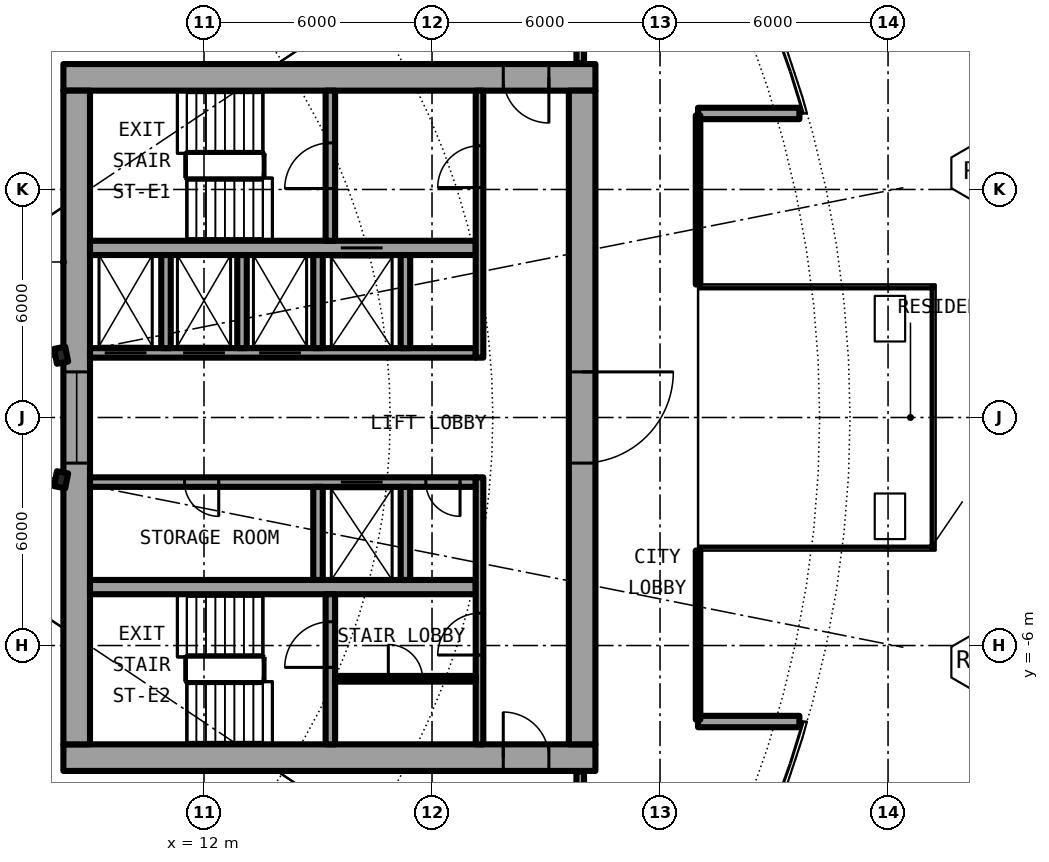
"""IFC4 building model, lengths in metres.
Left out: names, types, materials, properties, quantities, classifications, styles, units other than length and angle.
Written with IfcOpenShell. Run it as: python <this file> out.ifc"""

import sys

from ifc_helpers import new_model, si_unit, direction, frame, frame_2d, origin, origin_2d, place, context, subcontext, project, spatial, rectangle, i_section, extrude, element, fill, save


model = new_model("IFC4")
c1 = context("Model", 3, precision=1e-05, world=origin(), true_north=direction((0.0, 1.0)))
c2 = subcontext(c1, "Body", "Model", "MODEL_VIEW")
j1 = project(units=[si_unit("LENGTHUNIT", "METRE"), si_unit("PLANEANGLEUNIT", "RADIAN")], contexts=[c1])
p1 = place(None, origin())
s1 = spatial("IfcSite", under=j1, at=p1, CompositionType="ELEMENT")
p2 = place(p1, origin())
s2 = spatial("IfcBuilding", under=s1, at=p2, CompositionType="ELEMENT")
p3 = place(p2, frame((0.0, 0.0, 97.15)))
s3 = spatial("IfcBuildingStorey", under=s2, at=p3, CompositionType="ELEMENT", Elevation=97.15)
for number, where, z_axis, x_axis in (
    (1, (8.239, 1.639, 0.0), (0.0, 0.0, 1.0), (0.981, 0.195, 0.0)),
    (2, (8.239, -1.639, 0.0), (0.0, 0.0, 1.0), (0.981, -0.195, 0.0)),
):
    element("IfcColumn", number, at=place(p3, frame(where, z_axis=z_axis, x_axis=x_axis)), inside=s3, PredefinedType="COLUMN", context=c2, shape_type="SweptSolid", body=[
        extrude(i_section(OverallWidth=0.3, OverallDepth=0.4, WebThickness=0.013, FlangeThickness=0.024, FilletRadius=0.027, at=origin_2d()), origin(), (0.0, 0.0, 1.0), 6.1),
    ])
for number, where, z_axis, x_axis in (
    (3, (25.0, 8.0, 0.0), (0.0, 0.0, 1.0), (1.0, 0.0, 0.0)),
    (4, (25.0, -8.0, 0.0), (0.0, 0.0, 1.0), (1.0, 0.0, 0.0)),
):
    element("IfcWall", number, at=place(p3, frame(where, z_axis=z_axis, x_axis=x_axis)), inside=s3, PredefinedType="SOLIDWALL", context=c2, shape_type="SweptSolid", body=[
        extrude(rectangle(XDim=2.667, YDim=0.3, at=frame_2d((1.333, 0.0))), origin(), (0.0, 0.0, 1.0), 5.7),
    ])
p4 = place(p3, frame((22.3, 8.95, 0.0), z_axis=(0.0, 0.0, 1.0), x_axis=(-1.0, 0.0, 0.0)))
e5 = element("IfcWall", 5, at=p4, inside=s3, PredefinedType="SHEAR", context=c2, shape_type="SweptSolid", body=[
    extrude(rectangle(XDim=14.0, YDim=0.7, at=frame_2d((7.0, 0.0))), origin(), (0.0, 0.0, 1.0), 6.1),
])
p5 = place(p4, frame((1.225, 0.0, 0.0)))
e6 = element("IfcOpeningElement", 6, at=p5, cuts=e5, PredefinedType="OPENING", context=c2, shape_type="SweptSolid", body=[
    extrude(rectangle(XDim=1.2, YDim=2.3, at=frame_2d((0.6, 1.15))), frame((0.0, 0.36, 0.0), z_axis=(0.0, -1.0, 0.0), x_axis=(1.0, 0.0, 0.0)), (0.0, 0.0, 1.0), 0.72),
])
p6 = place(p3, frame((8.3, -8.95, 0.0), z_axis=(0.0, 0.0, 1.0), x_axis=(1.0, 0.0, 0.0)))
e7 = element("IfcWall", 7, at=p6, inside=s3, PredefinedType="SHEAR", context=c2, shape_type="SweptSolid", body=[
    extrude(rectangle(XDim=14.0, YDim=0.7, at=frame_2d((7.0, 0.0))), origin(), (0.0, 0.0, 1.0), 6.1),
])
p7 = place(p6, frame((11.575, 0.0, 0.0)))
e8 = element("IfcOpeningElement", 8, at=p7, cuts=e7, PredefinedType="OPENING", context=c2, shape_type="SweptSolid", body=[
    extrude(rectangle(XDim=1.2, YDim=2.3, at=frame_2d((0.6, 1.15))), frame((0.0, 0.36, 0.0), z_axis=(0.0, -1.0, 0.0), x_axis=(1.0, 0.0, 0.0)), (0.0, 0.0, 1.0), 0.72),
])
p8 = place(p3, frame((21.95, 8.6, 0.0), z_axis=(0.0, 0.0, 1.0), x_axis=(0.0, -1.0, 0.0)))
e9 = element("IfcWall", 9, at=p8, inside=s3, PredefinedType="SHEAR", context=c2, shape_type="SweptSolid", body=[
    extrude(rectangle(XDim=17.2, YDim=0.7, at=frame_2d((8.6, 0.0))), origin(), (0.0, 0.0, 1.0), 6.1),
])
p9 = place(p8, frame((7.4, 0.0, 0.0)))
e10 = element("IfcOpeningElement", 10, at=p9, cuts=e9, PredefinedType="OPENING", context=c2, shape_type="SweptSolid", body=[
    extrude(rectangle(XDim=2.4, YDim=2.3, at=frame_2d((1.2, 1.15))), frame((0.0, 0.36, 0.0), z_axis=(0.0, -1.0, 0.0), x_axis=(1.0, 0.0, 0.0)), (0.0, 0.0, 1.0), 0.72),
])
p10 = place(p3, frame((8.65, -8.6, 0.0), z_axis=(0.0, 0.0, 1.0), x_axis=(0.0, 1.0, 0.0)))
e11 = element("IfcWall", 11, at=p10, inside=s3, PredefinedType="SHEAR", context=c2, shape_type="SweptSolid", body=[
    extrude(rectangle(XDim=17.2, YDim=0.7, at=frame_2d((8.6, 0.0))), origin(), (0.0, 0.0, 1.0), 6.1),
])
p11 = place(p10, frame((7.4, 0.0, 0.1)))
e12 = element("IfcOpeningElement", 12, at=p11, cuts=e11, PredefinedType="OPENING", context=c2, shape_type="SweptSolid", body=[
    extrude(rectangle(XDim=2.4, YDim=2.2, at=frame_2d((1.2, 1.1))), frame((0.0, 0.36, 0.0), z_axis=(0.0, -1.0, 0.0), x_axis=(1.0, 0.0, 0.0)), (0.0, 0.0, 1.0), 0.72),
])
p12 = place(p3, frame((9.0, 1.7, 0.0), z_axis=(0.0, 0.0, 1.0), x_axis=(1.0, 0.0, 0.0)))
e13 = element("IfcWall", 13, at=p12, inside=s3, PredefinedType="SHEAR", context=c2, shape_type="SweptSolid", body=[
    extrude(rectangle(XDim=10.15, YDim=0.25, at=frame_2d((5.075, 0.0))), origin(), (0.0, 0.0, 1.0), 6.1),
])
p13 = place(p12, frame((0.387, 0.0, 0.0)))
e14 = element("IfcOpeningElement", 14, at=p13, cuts=e13, PredefinedType="OPENING", context=c2, shape_type="SweptSolid", body=[
    extrude(rectangle(XDim=1.1, YDim=2.3, at=frame_2d((0.55, 1.15))), frame((0.0, 0.135, 0.0), z_axis=(0.0, -1.0, 0.0), x_axis=(1.0, 0.0, 0.0)), (0.0, 0.0, 1.0), 0.27),
])
p14 = place(p12, frame((2.45, 0.0, 0.0)))
e15 = element("IfcOpeningElement", 15, at=p14, cuts=e13, PredefinedType="OPENING", context=c2, shape_type="SweptSolid", body=[
    extrude(rectangle(XDim=1.1, YDim=2.3, at=frame_2d((0.55, 1.15))), frame((0.0, 0.135, 0.0), z_axis=(0.0, -1.0, 0.0), x_axis=(1.0, 0.0, 0.0)), (0.0, 0.0, 1.0), 0.27),
])
p15 = place(p12, frame((4.45, 0.0, 0.0)))
e16 = element("IfcOpeningElement", 16, at=p15, cuts=e13, PredefinedType="OPENING", context=c2, shape_type="SweptSolid", body=[
    extrude(rectangle(XDim=1.1, YDim=2.3, at=frame_2d((0.55, 1.15))), frame((0.0, 0.135, 0.0), z_axis=(0.0, -1.0, 0.0), x_axis=(1.0, 0.0, 0.0)), (0.0, 0.0, 1.0), 0.27),
])
p16 = place(p3, frame((9.0, 4.462, 0.0), z_axis=(0.0, 0.0, 1.0), x_axis=(1.0, 0.0, 0.0)))
e17 = element("IfcWall", 17, at=p16, inside=s3, PredefinedType="SHEAR", context=c2, shape_type="SweptSolid", body=[
    extrude(rectangle(XDim=10.15, YDim=0.375, at=frame_2d((5.075, 0.0))), origin(), (0.0, 0.0, 1.0), 6.1),
])
p17 = place(p16, frame((6.6, 0.0, 0.0)))
e18 = element("IfcOpeningElement", 18, at=p17, cuts=e17, PredefinedType="OPENING", context=c2, shape_type="SweptSolid", body=[
    extrude(rectangle(XDim=1.1, YDim=2.3, at=frame_2d((0.55, 1.15))), frame((0.0, 0.198, 0.0), z_axis=(0.0, -1.0, 0.0), x_axis=(1.0, 0.0, 0.0)), (0.0, 0.0, 1.0), 0.395),
])
p18 = place(p3, frame((15.325, 4.65, 0.0), z_axis=(0.0, 0.0, 1.0), x_axis=(0.0, 1.0, 0.0)))
e19 = element("IfcWall", 19, at=p18, inside=s3, PredefinedType="SHEAR", context=c2, shape_type="SweptSolid", body=[
    extrude(rectangle(XDim=3.95, YDim=0.25, at=frame_2d((1.975, 0.0))), origin(), (0.0, 0.0, 1.0), 6.1),
])
p19 = place(p18, frame((1.375, 0.0, 0.0)))
e20 = element("IfcOpeningElement", 20, at=p19, cuts=e19, PredefinedType="OPENING", context=c2, shape_type="SweptSolid", body=[
    extrude(rectangle(XDim=1.2, YDim=2.3, at=frame_2d((0.6, 1.15))), frame((0.0, 0.135, 0.0), z_axis=(0.0, -1.0, 0.0), x_axis=(1.0, 0.0, 0.0)), (0.0, 0.0, 1.0), 0.27),
])
for number, where, z_axis, x_axis in (
    (21, (15.0, 1.825, 0.0), (0.0, 0.0, 1.0), (0.0, 1.0, 0.0)),
    (22, (17.3, 1.825, 0.0), (0.0, 0.0, 1.0), (0.0, 1.0, 0.0)),
):
    element("IfcWall", number, at=place(p3, frame(where, z_axis=z_axis, x_axis=x_axis)), inside=s3, PredefinedType="SOLIDWALL", context=c2, shape_type="SweptSolid", body=[
        extrude(rectangle(XDim=2.45, YDim=0.25, at=frame_2d((1.225, 0.0))), origin(), (0.0, 0.0, 1.0), 5.7),
    ])
p20 = place(p3, frame((19.25, 1.575, 0.0), z_axis=(0.0, 0.0, 1.0), x_axis=(0.0, 1.0, 0.0)))
e23 = element("IfcWall", 23, at=p20, inside=s3, PredefinedType="SOLIDWALL", context=c2, shape_type="SweptSolid", body=[
    extrude(rectangle(XDim=7.025, YDim=0.2, at=frame_2d((3.513, 0.0))), origin(), (0.0, 0.0, 1.0), 5.7),
])
p21 = place(p20, frame((4.475, 0.0, 0.0)))
e24 = element("IfcOpeningElement", 24, at=p21, cuts=e23, PredefinedType="OPENING", context=c2, shape_type="SweptSolid", body=[
    extrude(rectangle(XDim=1.1, YDim=2.3, at=frame_2d((0.55, 1.15))), frame((0.0, 0.11, 0.0), z_axis=(0.0, -1.0, 0.0), x_axis=(1.0, 0.0, 0.0)), (0.0, 0.0, 1.0), 0.22),
])
p22 = place(p3, frame((19.15, -1.7, 0.0), z_axis=(0.0, 0.0, 1.0), x_axis=(-1.0, 0.0, 0.0)))
e25 = element("IfcWall", 25, at=p22, inside=s3, PredefinedType="SHEAR", context=c2, shape_type="SweptSolid", body=[
    extrude(rectangle(XDim=10.15, YDim=0.25, at=frame_2d((5.075, 0.0))), origin(), (0.0, 0.0, 1.0), 6.1),
])
p23 = place(p22, frame((2.45, 0.0, 0.0)))
e26 = element("IfcOpeningElement", 26, at=p23, cuts=e25, PredefinedType="OPENING", context=c2, shape_type="SweptSolid", body=[
    extrude(rectangle(XDim=1.1, YDim=2.3, at=frame_2d((0.55, 1.15))), frame((0.0, 0.135, 0.0), z_axis=(0.0, -1.0, 0.0), x_axis=(1.0, 0.0, 0.0)), (0.0, 0.0, 1.0), 0.27),
])
p24 = place(p22, frame((6.762, 0.0, 0.0)))
e27 = element("IfcOpeningElement", 27, at=p24, cuts=e25, PredefinedType="OPENING", context=c2, shape_type="SweptSolid", body=[
    extrude(rectangle(XDim=0.9, YDim=2.3, at=frame_2d((0.45, 1.15))), frame((0.0, 0.135, 0.0), z_axis=(0.0, -1.0, 0.0), x_axis=(1.0, 0.0, 0.0)), (0.0, 0.0, 1.0), 0.27),
])
p25 = place(p22, frame((0.413, 0.0, 0.0)))
e28 = element("IfcOpeningElement", 28, at=p25, cuts=e25, PredefinedType="OPENING", context=c2, shape_type="SweptSolid", body=[
    extrude(rectangle(XDim=0.9, YDim=2.3, at=frame_2d((0.45, 1.15))), frame((0.0, 0.135, 0.0), z_axis=(0.0, -1.0, 0.0), x_axis=(1.0, 0.0, 0.0)), (0.0, 0.0, 1.0), 0.27),
])
p26 = place(p3, frame((9.0, -4.462, 0.0), z_axis=(0.0, 0.0, 1.0), x_axis=(1.0, 0.0, 0.0)))
e29 = element("IfcWall", 29, at=p26, inside=s3, PredefinedType="SHEAR", context=c2, shape_type="SweptSolid", body=[
    extrude(rectangle(XDim=10.15, YDim=0.375, at=frame_2d((5.075, 0.0))), origin(), (0.0, 0.0, 1.0), 6.1),
])
p27 = place(p3, frame((15.325, -8.6, 0.0), z_axis=(0.0, 0.0, 1.0), x_axis=(0.0, 1.0, 0.0)))
e30 = element("IfcWall", 30, at=p27, inside=s3, PredefinedType="SHEAR", context=c2, shape_type="SweptSolid", body=[
    extrude(rectangle(XDim=3.95, YDim=0.25, at=frame_2d((1.975, 0.0))), origin(), (0.0, 0.0, 1.0), 6.1),
])
p28 = place(p27, frame((2.025, 0.0, 0.0)))
e31 = element("IfcOpeningElement", 31, at=p28, cuts=e30, PredefinedType="OPENING", context=c2, shape_type="SweptSolid", body=[
    extrude(rectangle(XDim=1.2, YDim=2.3, at=frame_2d((0.6, 1.15))), frame((0.0, 0.135, 0.0), z_axis=(0.0, -1.0, 0.0), x_axis=(1.0, 0.0, 0.0)), (0.0, 0.0, 1.0), 0.27),
])
for number, where, z_axis, x_axis in (
    (32, (15.0, -1.825, 0.0), (0.0, 0.0, 1.0), (0.0, -1.0, 0.0)),
    (33, (17.3, -1.825, 0.0), (0.0, 0.0, 1.0), (0.0, -1.0, 0.0)),
):
    element("IfcWall", number, at=place(p3, frame(where, z_axis=z_axis, x_axis=x_axis)), inside=s3, PredefinedType="SOLIDWALL", context=c2, shape_type="SweptSolid", body=[
        extrude(rectangle(XDim=2.45, YDim=0.25, at=frame_2d((1.225, 0.0))), origin(), (0.0, 0.0, 1.0), 5.7),
    ])
p29 = place(p3, frame((19.25, -8.6, 0.0), z_axis=(0.0, 0.0, 1.0), x_axis=(0.0, 1.0, 0.0)))
e34 = element("IfcWall", 34, at=p29, inside=s3, PredefinedType="SOLIDWALL", context=c2, shape_type="SweptSolid", body=[
    extrude(rectangle(XDim=7.025, YDim=0.2, at=frame_2d((3.513, 0.0))), origin(), (0.0, 0.0, 1.0), 5.7),
])
p30 = place(p29, frame((2.35, 0.0, 0.0)))
e35 = element("IfcOpeningElement", 35, at=p30, cuts=e34, PredefinedType="OPENING", context=c2, shape_type="SweptSolid", body=[
    extrude(rectangle(XDim=1.1, YDim=2.3, at=frame_2d((0.55, 1.15))), frame((0.0, 0.11, 0.0), z_axis=(0.0, -1.0, 0.0), x_axis=(1.0, 0.0, 0.0)), (0.0, 0.0, 1.0), 0.22),
])
for number, where, z_axis, x_axis in (
    (36, (11.0, 1.825, 0.0), (0.0, 0.0, 1.0), (0.0, 1.0, 0.0)),
    (37, (13.0, 1.825, 0.0), (0.0, 0.0, 1.0), (0.0, 1.0, 0.0)),
):
    element("IfcWall", number, at=place(p3, frame(where, z_axis=z_axis, x_axis=x_axis)), inside=s3, PredefinedType="SOLIDWALL", context=c2, shape_type="SweptSolid", body=[
        extrude(rectangle(XDim=2.45, YDim=0.25, at=frame_2d((1.225, 0.0))), origin(), (0.0, 0.0, 1.0), 5.7),
    ])
p31 = place(p3, frame((15.45, -6.875, 0.0), z_axis=(0.0, 0.0, 1.0), x_axis=(1.0, 0.0, 0.0)))
e38 = element("IfcWall", 38, at=p31, inside=s3, PredefinedType="PARTITIONING", context=c2, shape_type="SweptSolid", body=[
    extrude(rectangle(XDim=3.7, YDim=0.15, at=frame_2d((1.85, 0.0))), origin(), (0.0, 0.0, 1.0), 5.7),
])
p32 = place(p31, frame((1.4, 0.0, 0.0)))
e39 = element("IfcOpeningElement", 39, at=p32, cuts=e38, PredefinedType="OPENING", context=c2, shape_type="SweptSolid", body=[
    extrude(rectangle(XDim=0.9, YDim=2.3, at=frame_2d((0.45, 1.15))), frame((0.0, 0.085, 0.0), z_axis=(0.0, -1.0, 0.0), x_axis=(1.0, 0.0, 0.0)), (0.0, 0.0, 1.0), 0.17),
])
p33 = place(p3, frame((25.0, -3.5, 0.0), z_axis=(0.0, 0.0, 1.0), x_axis=(0.0, -1.0, 0.0)))
e40 = element("IfcWall", 40, at=p33, inside=s3, PredefinedType="PARTITIONING", context=c2, shape_type="SweptSolid", body=[
    extrude(rectangle(XDim=4.45, YDim=0.12, at=frame_2d((2.225, 0.0))), origin(), (0.0, 0.0, 1.0), 5.7),
])
p34 = place(p33, frame((0.4, 0.0, 0.1)))
e41 = element("IfcOpeningElement", 41, at=p34, cuts=e40, PredefinedType="OPENING", context=c2, shape_type="SweptSolid", body=[
    extrude(rectangle(XDim=3.6, YDim=5.35, at=frame_2d((1.8, 2.675))), frame((0.0, 0.07, 0.0), z_axis=(0.0, -1.0, 0.0), x_axis=(1.0, 0.0, 0.0)), (0.0, 0.0, 1.0), 0.14),
])
p35 = place(p3, frame((25.0, 3.5, 0.0), z_axis=(0.0, 0.0, 1.0), x_axis=(0.0, 1.0, 0.0)))
e42 = element("IfcWall", 42, at=p35, inside=s3, PredefinedType="PARTITIONING", context=c2, shape_type="SweptSolid", body=[
    extrude(rectangle(XDim=4.45, YDim=0.12, at=frame_2d((2.225, 0.0))), origin(), (0.0, 0.0, 1.0), 5.7),
])
p36 = place(p35, frame((0.4, 0.0, 0.1)))
e43 = element("IfcOpeningElement", 43, at=p36, cuts=e42, PredefinedType="OPENING", context=c2, shape_type="SweptSolid", body=[
    extrude(rectangle(XDim=3.6, YDim=5.35, at=frame_2d((1.8, 2.675))), frame((0.0, 0.07, 0.0), z_axis=(0.0, -1.0, 0.0), x_axis=(1.0, 0.0, 0.0)), (0.0, 0.0, 1.0), 0.14),
])
for number, where, z_axis, x_axis in (
    (44, (21.9, -12.72, 0.0), (0.0, 0.0, 1.0), (0.0, 1.0, 0.0)),
    (45, (21.9, 9.32, 0.0), (0.0, 0.0, 1.0), (0.0, 1.0, 0.0)),
):
    element("IfcWall", number, at=place(p3, frame(where, z_axis=z_axis, x_axis=x_axis)), inside=s3, PredefinedType="PARTITIONING", context=c2, shape_type="SweptSolid", body=[
        extrude(rectangle(XDim=3.4, YDim=0.2, at=frame_2d((1.7, 0.0))), origin(), (0.0, 0.0, 1.0), 5.7),
    ])
p37 = place(p3, frame((3.144, -9.259, 0.0), z_axis=(0.0, 0.0, 1.0), x_axis=(0.321485791184, -0.946914402714, 0.0)))
e46 = element("IfcWall", 46, at=p37, inside=s3, PredefinedType="PARTITIONING", context=c2, shape_type="SweptSolid", body=[
    extrude(rectangle(XDim=17.438, YDim=0.15, at=frame_2d((8.719, 0.0))), origin(), (0.0, 0.0, 1.0), 5.7),
])
p38 = place(p13, origin())
e47 = element("IfcDoor", 47, at=p38, inside=s3, OperationType="DOUBLE_DOOR_SLIDING", PredefinedType="DOOR", context=c2, shape_type="SweptSolid", body=[
    extrude(rectangle(XDim=1.1, YDim=2.3, at=frame_2d((0.55, 1.15))), frame((0.0, 0.025, 0.0), z_axis=(0.0, -1.0, 0.0), x_axis=(1.0, 0.0, 0.0)), (0.0, 0.0, 1.0), 0.05),
])
fill(e14, e47)
p39 = place(p14, origin())
e48 = element("IfcDoor", 48, at=p39, inside=s3, OperationType="DOUBLE_DOOR_SLIDING", PredefinedType="DOOR", context=c2, shape_type="SweptSolid", body=[
    extrude(rectangle(XDim=1.1, YDim=2.3, at=frame_2d((0.55, 1.15))), frame((0.0, 0.025, 0.0), z_axis=(0.0, -1.0, 0.0), x_axis=(1.0, 0.0, 0.0)), (0.0, 0.0, 1.0), 0.05),
])
fill(e15, e48)
p40 = place(p15, origin())
e49 = element("IfcDoor", 49, at=p40, inside=s3, OperationType="DOUBLE_DOOR_SLIDING", PredefinedType="DOOR", context=c2, shape_type="SweptSolid", body=[
    extrude(rectangle(XDim=1.1, YDim=2.3, at=frame_2d((0.55, 1.15))), frame((0.0, 0.025, 0.0), z_axis=(0.0, -1.0, 0.0), x_axis=(1.0, 0.0, 0.0)), (0.0, 0.0, 1.0), 0.05),
])
fill(e16, e49)
p41 = place(p17, origin())
e50 = element("IfcDoor", 50, at=p41, inside=s3, OperationType="DOUBLE_DOOR_SLIDING", PredefinedType="DOOR", context=c2, shape_type="SweptSolid", body=[
    extrude(rectangle(XDim=1.1, YDim=2.3, at=frame_2d((0.55, 1.15))), frame((0.0, 0.025, 0.0), z_axis=(0.0, -1.0, 0.0), x_axis=(1.0, 0.0, 0.0)), (0.0, 0.0, 1.0), 0.05),
])
fill(e18, e50)
p42 = place(p23, origin())
e51 = element("IfcDoor", 51, at=p42, inside=s3, OperationType="DOUBLE_DOOR_SLIDING", PredefinedType="DOOR", context=c2, shape_type="SweptSolid", body=[
    extrude(rectangle(XDim=1.1, YDim=2.3, at=frame_2d((0.55, 1.15))), frame((0.0, 0.025, 0.0), z_axis=(0.0, -1.0, 0.0), x_axis=(1.0, 0.0, 0.0)), (0.0, 0.0, 1.0), 0.05),
])
fill(e26, e51)
p43 = place(p24, origin())
e52 = element("IfcDoor", 52, at=p43, inside=s3, OperationType="SINGLE_SWING_LEFT", PredefinedType="DOOR", context=c2, shape_type="SweptSolid", body=[
    extrude(rectangle(XDim=0.9, YDim=2.3, at=frame_2d((0.45, 1.15))), frame((0.0, 0.025, 0.0), z_axis=(0.0, -1.0, 0.0), x_axis=(1.0, 0.0, 0.0)), (0.0, 0.0, 1.0), 0.05),
])
fill(e27, e52)
p44 = place(p25, origin())
e53 = element("IfcDoor", 53, at=p44, inside=s3, OperationType="SINGLE_SWING_RIGHT", PredefinedType="DOOR", context=c2, shape_type="SweptSolid", body=[
    extrude(rectangle(XDim=0.9, YDim=2.3, at=frame_2d((0.45, 1.15))), frame((0.0, 0.025, 0.0), z_axis=(0.0, -1.0, 0.0), x_axis=(1.0, 0.0, 0.0)), (0.0, 0.0, 1.0), 0.05),
])
fill(e28, e53)
p45 = place(p32, origin())
e54 = element("IfcDoor", 54, at=p45, inside=s3, OperationType="SINGLE_SWING_LEFT", PredefinedType="DOOR", context=c2, shape_type="SweptSolid", body=[
    extrude(rectangle(XDim=0.9, YDim=2.3, at=frame_2d((0.45, 1.15))), frame((0.0, 0.025, 0.0), z_axis=(0.0, -1.0, 0.0), x_axis=(1.0, 0.0, 0.0)), (0.0, 0.0, 1.0), 0.05),
])
fill(e39, e54)
p46 = place(p19, origin())
e55 = element("IfcDoor", 55, at=p46, inside=s3, OperationType="SINGLE_SWING_LEFT", PredefinedType="DOOR", context=c2, shape_type="SweptSolid", body=[
    extrude(rectangle(XDim=1.2, YDim=2.3, at=frame_2d((0.6, 1.15))), frame((0.0, 0.025, 0.0), z_axis=(0.0, -1.0, 0.0), x_axis=(1.0, 0.0, 0.0)), (0.0, 0.0, 1.0), 0.05),
])
fill(e20, e55)
p47 = place(p28, origin())
e56 = element("IfcDoor", 56, at=p47, inside=s3, OperationType="SINGLE_SWING_LEFT", PredefinedType="DOOR", context=c2, shape_type="SweptSolid", body=[
    extrude(rectangle(XDim=1.2, YDim=2.3, at=frame_2d((0.6, 1.15))), frame((0.0, 0.025, 0.0), z_axis=(0.0, -1.0, 0.0), x_axis=(1.0, 0.0, 0.0)), (0.0, 0.0, 1.0), 0.05),
])
fill(e31, e56)
p48 = place(p21, origin())
e57 = element("IfcDoor", 57, at=p48, inside=s3, OperationType="SINGLE_SWING_LEFT", PredefinedType="DOOR", context=c2, shape_type="SweptSolid", body=[
    extrude(rectangle(XDim=1.1, YDim=2.3, at=frame_2d((0.55, 1.15))), frame((0.0, 0.025, 0.0), z_axis=(0.0, -1.0, 0.0), x_axis=(1.0, 0.0, 0.0)), (0.0, 0.0, 1.0), 0.05),
])
fill(e24, e57)
p49 = place(p30, origin())
e58 = element("IfcDoor", 58, at=p49, inside=s3, OperationType="SINGLE_SWING_RIGHT", PredefinedType="DOOR", context=c2, shape_type="SweptSolid", body=[
    extrude(rectangle(XDim=1.1, YDim=2.3, at=frame_2d((0.55, 1.15))), frame((0.0, 0.025, 0.0), z_axis=(0.0, -1.0, 0.0), x_axis=(1.0, 0.0, 0.0)), (0.0, 0.0, 1.0), 0.05),
])
fill(e35, e58)
p50 = place(p5, origin())
e59 = element("IfcDoor", 59, at=p50, inside=s3, OperationType="SINGLE_SWING_RIGHT", PredefinedType="DOOR", context=c2, shape_type="SweptSolid", body=[
    extrude(rectangle(XDim=1.2, YDim=2.3, at=frame_2d((0.6, 1.15))), frame((0.0, 0.025, 0.0), z_axis=(0.0, -1.0, 0.0), x_axis=(1.0, 0.0, 0.0)), (0.0, 0.0, 1.0), 0.05),
])
fill(e6, e59)
p51 = place(p7, origin())
e60 = element("IfcDoor", 60, at=p51, inside=s3, OperationType="SINGLE_SWING_LEFT", PredefinedType="DOOR", context=c2, shape_type="SweptSolid", body=[
    extrude(rectangle(XDim=1.2, YDim=2.3, at=frame_2d((0.6, 1.15))), frame((0.0, 0.025, 0.0), z_axis=(0.0, -1.0, 0.0), x_axis=(1.0, 0.0, 0.0)), (0.0, 0.0, 1.0), 0.05),
])
fill(e8, e60)
p52 = place(p9, origin())
e61 = element("IfcDoor", 61, at=p52, inside=s3, OperationType="SINGLE_SWING_LEFT", PredefinedType="DOOR", context=c2, shape_type="SweptSolid", body=[
    extrude(rectangle(XDim=2.4, YDim=2.3, at=frame_2d((1.2, 1.15))), frame((0.0, 0.025, 0.0), z_axis=(0.0, -1.0, 0.0), x_axis=(1.0, 0.0, 0.0)), (0.0, 0.0, 1.0), 0.05),
])
fill(e10, e61)
p53 = place(p11, origin())
e62 = element("IfcWindow", 62, at=p53, inside=s3, PartitioningType="SINGLE_PANEL", PredefinedType="WINDOW", context=c2, shape_type="SweptSolid", body=[
    extrude(rectangle(XDim=2.4, YDim=2.2, at=frame_2d((1.2, 1.1))), frame((0.0, 0.03, 0.0), z_axis=(0.0, -1.0, 0.0), x_axis=(1.0, 0.0, 0.0)), (0.0, 0.0, 1.0), 0.06),
])
fill(e12, e62)
p54 = place(p34, origin())
e63 = element("IfcWindow", 63, at=p54, inside=s3, PartitioningType="SINGLE_PANEL", PredefinedType="WINDOW", context=c2, shape_type="SweptSolid", body=[
    extrude(rectangle(XDim=3.6, YDim=5.35, at=frame_2d((1.8, 2.675))), frame((0.0, 0.03, 0.0), z_axis=(0.0, -1.0, 0.0), x_axis=(1.0, 0.0, 0.0)), (0.0, 0.0, 1.0), 0.06),
])
fill(e41, e63)
p55 = place(p36, origin())
e64 = element("IfcWindow", 64, at=p55, inside=s3, PartitioningType="SINGLE_PANEL", PredefinedType="WINDOW", context=c2, shape_type="SweptSolid", body=[
    extrude(rectangle(XDim=3.6, YDim=5.35, at=frame_2d((1.8, 2.675))), frame((0.0, 0.03, 0.0), z_axis=(0.0, -1.0, 0.0), x_axis=(1.0, 0.0, 0.0)), (0.0, 0.0, 1.0), 0.06),
])
fill(e43, e64)
save(model, sys.argv[1])
